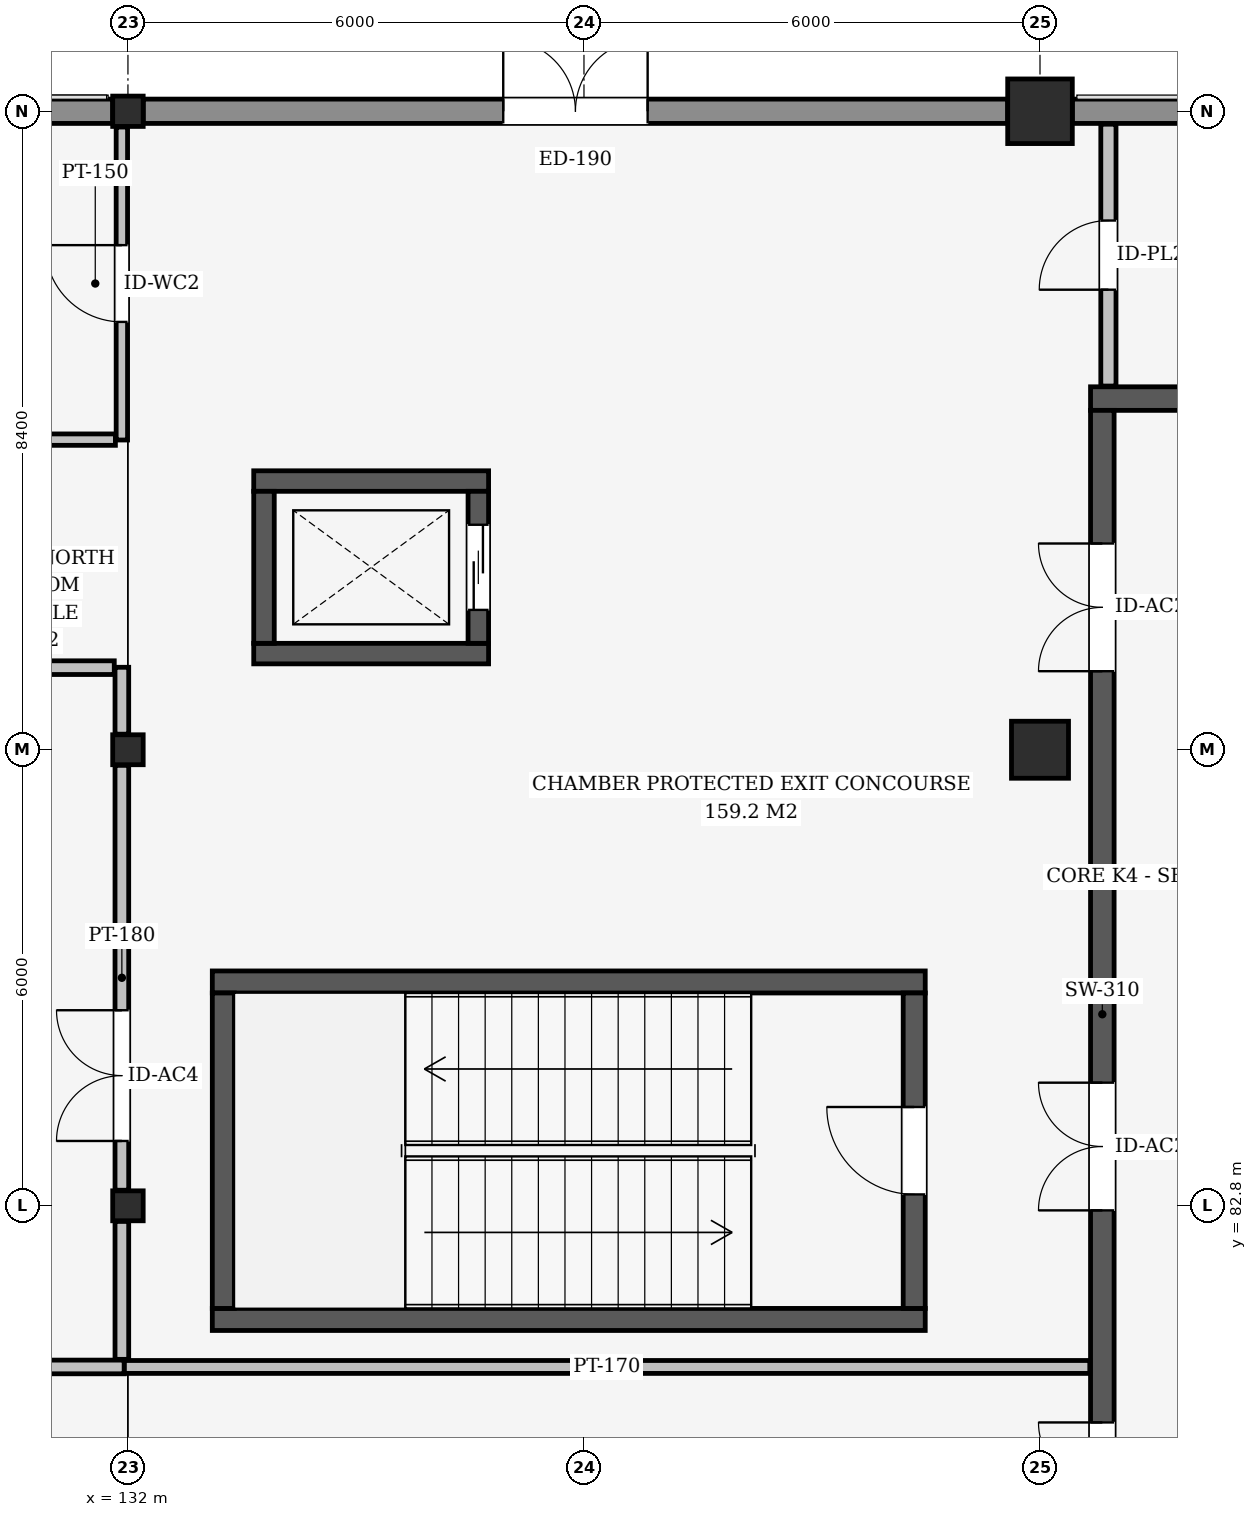
"""IFC4 building model, lengths in metres.
Left out: names, types, materials, properties, quantities, classifications, styles, units other than length and angle.
Written with IfcOpenShell. Run it as: python <this file> out.ifc"""

import sys

from ifc_helpers import new_model, si_unit, direction, frame, frame_2d, origin, origin_2d, place, context, subcontext, project, spatial, rectangle, i_section, extrude, element, fill, save


model = new_model("IFC4")
c1 = context("Model", 3, precision=1e-05, world=origin(), true_north=direction((0.0, 1.0)))
c2 = subcontext(c1, "Body", "Model", "MODEL_VIEW")
j1 = project(units=[si_unit("LENGTHUNIT", "METRE"), si_unit("PLANEANGLEUNIT", "RADIAN")], contexts=[c1])
p1 = place(None, origin())
s1 = spatial("IfcSite", under=j1, at=p1, CompositionType="ELEMENT")
p2 = place(p1, origin())
s2 = spatial("IfcBuilding", under=s1, at=p2, CompositionType="ELEMENT")
p3 = place(p2, origin())
s3 = spatial("IfcBuildingStorey", under=s2, at=p3, CompositionType="ELEMENT", Elevation=0.0)
for number, where, z_axis, x_axis in (
    (1, (132.0, 82.8, 0.0), (0.0, 0.0, 1.0), (1.0, 0.0, 0.0)),
    (2, (132.0, 88.8, 0.0), (0.0, 0.0, 1.0), (1.0, 0.0, 0.0)),
):
    element("IfcColumn", number, at=place(p3, frame(where, z_axis=z_axis, x_axis=x_axis)), inside=s3, PredefinedType="COLUMN", context=c2, shape_type="SweptSolid", body=[
        extrude(i_section(OverallWidth=0.401, OverallDepth=0.394, WebThickness=0.023, FlangeThickness=0.037, at=origin_2d()), origin(), (0.0, 0.0, 1.0), 4.8),
    ])
p4 = place(p3, frame((132.0, 97.2, 0.0), z_axis=(0.0, 0.0, 1.0), x_axis=(1.0, 0.0, 0.0)))
e3 = element("IfcColumn", 3, at=p4, inside=s3, PredefinedType="COLUMN", context=c2, shape_type="SweptSolid", body=[
    extrude(i_section(OverallWidth=0.401, OverallDepth=0.399, WebThickness=0.025, FlangeThickness=0.04, at=origin_2d()), origin(), (0.0, 0.0, 1.0), 4.8),
])
p5 = place(p3, frame((144.0, 88.8, 0.0), z_axis=(0.0, 0.0, 1.0), x_axis=(1.0, 0.0, 0.0)))
e4 = element("IfcColumn", 4, at=p5, inside=s3, PredefinedType="COLUMN", context=c2, shape_type="SweptSolid", body=[
    extrude(rectangle(XDim=0.75, YDim=0.75, at=origin_2d()), origin(), (0.0, 0.0, 1.0), 4.8),
])
p6 = place(p3, frame((144.0, 97.2, 0.0), z_axis=(0.0, 0.0, 1.0), x_axis=(1.0, 0.0, 0.0)))
e5 = element("IfcColumn", 5, at=p6, inside=s3, PredefinedType="COLUMN", context=c2, shape_type="SweptSolid", body=[
    extrude(rectangle(XDim=0.85, YDim=0.85, at=origin_2d()), origin(), (0.0, 0.0, 1.0), 4.8),
])
p7 = place(p3, frame((144.665, 93.42, 0.0), z_axis=(0.0, 0.0, 1.0), x_axis=(1.0, 0.0, 0.0)))
e6 = element("IfcWall", 6, at=p7, inside=s3, PredefinedType="SHEAR", context=c2, shape_type="SweptSolid", body=[
    extrude(rectangle(XDim=12.67, YDim=0.31, at=frame_2d((6.335, 0.0))), origin(), (0.0, 0.0, 1.0), 4.5),
])
p8 = place(p7, frame((5.88, 0.0, 0.0)))
e7 = element("IfcOpeningElement", 7, at=p8, cuts=e6, PredefinedType="OPENING", context=c2, shape_type="SweptSolid", body=[
    extrude(rectangle(XDim=0.91, YDim=2.1, at=frame_2d((0.455, 1.05))), frame((0.0, 0.165, 0.0), z_axis=(0.0, -1.0, 0.0), x_axis=(1.0, 0.0, 0.0)), (0.0, 0.0, 1.0), 0.33),
])
p9 = place(p3, frame((144.82, 77.375, 0.0), z_axis=(0.0, 0.0, 1.0), x_axis=(0.0, 1.0, 0.0)))
e8 = element("IfcWall", 8, at=p9, inside=s3, PredefinedType="SHEAR", context=c2, shape_type="SweptSolid", body=[
    extrude(rectangle(XDim=15.89, YDim=0.31, at=frame_2d((7.945, 0.0))), origin(), (0.0, 0.0, 1.0), 4.5),
])
p10 = place(p9, frame((0.895, 0.0, 0.0)))
e9 = element("IfcOpeningElement", 9, at=p10, cuts=e8, PredefinedType="OPENING", context=c2, shape_type="SweptSolid", body=[
    extrude(rectangle(XDim=1.68, YDim=2.32, at=frame_2d((0.84, 1.16))), frame((0.0, 0.165, 0.0), z_axis=(0.0, -1.0, 0.0), x_axis=(1.0, 0.0, 0.0)), (0.0, 0.0, 1.0), 0.33),
])
p11 = place(p9, frame((5.365, 0.0, 0.0)))
e10 = element("IfcOpeningElement", 10, at=p11, cuts=e8, PredefinedType="OPENING", context=c2, shape_type="SweptSolid", body=[
    extrude(rectangle(XDim=1.68, YDim=2.32, at=frame_2d((0.84, 1.16))), frame((0.0, 0.165, 0.0), z_axis=(0.0, -1.0, 0.0), x_axis=(1.0, 0.0, 0.0)), (0.0, 0.0, 1.0), 0.33),
])
p12 = place(p9, frame((12.458, 0.0, 0.0)))
e11 = element("IfcOpeningElement", 11, at=p12, cuts=e8, PredefinedType="OPENING", context=c2, shape_type="SweptSolid", body=[
    extrude(rectangle(XDim=1.68, YDim=2.32, at=frame_2d((0.84, 1.16))), frame((0.0, 0.165, 0.0), z_axis=(0.0, -1.0, 0.0), x_axis=(1.0, 0.0, 0.0)), (0.0, 0.0, 1.0), 0.33),
])
p13 = place(p3, frame((120.2, 97.2, 0.0), z_axis=(0.0, 0.0, 1.0), x_axis=(1.0, 0.0, 0.0)))
e12 = element("IfcWall", 12, at=p13, inside=s3, PredefinedType="SOLIDWALL", context=c2, shape_type="SweptSolid", body=[
    extrude(rectangle(XDim=11.599, YDim=0.32, at=frame_2d((5.8, 0.0))), origin(), (0.0, 0.0, 1.0), 3.67),
])
p14 = place(p13, frame((2.423, 0.0, 0.85)))
e13 = element("IfcOpeningElement", 13, at=p14, cuts=e12, PredefinedType="OPENING", context=c2, shape_type="SweptSolid", body=[
    extrude(rectangle(XDim=1.65, YDim=1.75, at=frame_2d((0.825, 0.875))), frame((0.0, 0.17, 0.0), z_axis=(0.0, -1.0, 0.0), x_axis=(1.0, 0.0, 0.0)), (0.0, 0.0, 1.0), 0.34),
])
p15 = place(p3, frame((132.2, 97.2, 0.0), z_axis=(0.0, 0.0, 1.0), x_axis=(1.0, 0.0, 0.0)))
e14 = element("IfcWall", 14, at=p15, inside=s3, PredefinedType="SOLIDWALL", context=c2, shape_type="SweptSolid", body=[
    extrude(rectangle(XDim=11.375, YDim=0.32, at=frame_2d((5.687, 0.0))), origin(), (0.0, 0.0, 1.0), 3.67),
])
p16 = place(p15, frame((4.737, 0.0, 0.0)))
e15 = element("IfcOpeningElement", 15, at=p16, cuts=e14, PredefinedType="OPENING", context=c2, shape_type="SweptSolid", body=[
    extrude(rectangle(XDim=1.9, YDim=2.35, at=frame_2d((0.95, 1.175))), frame((0.0, 0.17, 0.0), z_axis=(0.0, -1.0, 0.0), x_axis=(1.0, 0.0, 0.0)), (0.0, 0.0, 1.0), 0.34),
])
p17 = place(p3, frame((144.425, 97.2, 0.0), z_axis=(0.0, 0.0, 1.0), x_axis=(1.0, 0.0, 0.0)))
e16 = element("IfcWall", 16, at=p17, inside=s3, PredefinedType="SOLIDWALL", context=c2, shape_type="SweptSolid", body=[
    extrude(rectangle(XDim=11.15, YDim=0.32, at=frame_2d((5.575, 0.0))), origin(), (0.0, 0.0, 1.0), 3.63),
])
for number, where, z_axis, x_axis in (
    (17, (133.11, 81.305, 0.0), (0.0, 0.0, 1.0), (1.0, 0.0, 0.0)),
    (18, (133.11, 85.745, 0.0), (0.0, 0.0, 1.0), (1.0, 0.0, 0.0)),
):
    element("IfcWall", number, at=place(p3, frame(where, z_axis=z_axis, x_axis=x_axis)), inside=s3, PredefinedType="SHEAR", context=c2, shape_type="SweptSolid", body=[
        extrude(rectangle(XDim=9.38, YDim=0.29, at=frame_2d((4.69, 0.0))), origin(), (0.0, 0.0, 1.0), 4.54),
    ])
p18 = place(p3, frame((133.255, 81.45, 0.0), z_axis=(0.0, 0.0, 1.0), x_axis=(0.0, 1.0, 0.0)))
e19 = element("IfcWall", 19, at=p18, inside=s3, PredefinedType="SHEAR", context=c2, shape_type="SweptSolid", body=[
    extrude(rectangle(XDim=4.15, YDim=0.29, at=frame_2d((2.075, 0.0))), origin(), (0.0, 0.0, 1.0), 4.54),
])
p19 = place(p3, frame((142.345, 81.45, 0.0), z_axis=(0.0, 0.0, 1.0), x_axis=(0.0, 1.0, 0.0)))
e20 = element("IfcWall", 20, at=p19, inside=s3, PredefinedType="SHEAR", context=c2, shape_type="SweptSolid", body=[
    extrude(rectangle(XDim=4.15, YDim=0.29, at=frame_2d((2.075, 0.0))), origin(), (0.0, 0.0, 1.0), 4.54),
])
p20 = place(p19, frame((1.5, 0.0, 0.0)))
e21 = element("IfcOpeningElement", 21, at=p20, cuts=e20, PredefinedType="OPENING", context=c2, shape_type="SweptSolid", body=[
    extrude(rectangle(XDim=1.15, YDim=2.15, at=frame_2d((0.575, 1.075))), frame((0.0, 0.155, 0.0), z_axis=(0.0, -1.0, 0.0), x_axis=(1.0, 0.0, 0.0)), (0.0, 0.0, 1.0), 0.31),
])
for number, where, z_axis, x_axis in (
    (22, (133.655, 90.065, 0.0), (0.0, 0.0, 1.0), (1.0, 0.0, 0.0)),
    (23, (133.655, 92.335, 0.0), (0.0, 0.0, 1.0), (1.0, 0.0, 0.0)),
):
    element("IfcWall", number, at=place(p3, frame(where, z_axis=z_axis, x_axis=x_axis)), inside=s3, PredefinedType="SHEAR", context=c2, shape_type="SweptSolid", body=[
        extrude(rectangle(XDim=3.09, YDim=0.27, at=frame_2d((1.545, 0.0))), origin(), (0.0, 0.0, 1.0), 4.54),
    ])
p21 = place(p3, frame((133.79, 90.2, 0.0), z_axis=(0.0, 0.0, 1.0), x_axis=(0.0, 1.0, 0.0)))
e24 = element("IfcWall", 24, at=p21, inside=s3, PredefinedType="SHEAR", context=c2, shape_type="SweptSolid", body=[
    extrude(rectangle(XDim=2.0, YDim=0.27, at=frame_2d((1.0, 0.0))), origin(), (0.0, 0.0, 1.0), 4.54),
])
p22 = place(p3, frame((136.61, 90.2, 0.0), z_axis=(0.0, 0.0, 1.0), x_axis=(0.0, 1.0, 0.0)))
e25 = element("IfcWall", 25, at=p22, inside=s3, PredefinedType="SHEAR", context=c2, shape_type="SweptSolid", body=[
    extrude(rectangle(XDim=2.0, YDim=0.27, at=frame_2d((1.0, 0.0))), origin(), (0.0, 0.0, 1.0), 4.54),
])
p23 = place(p22, frame((0.44, 0.0, 0.0)))
e26 = element("IfcOpeningElement", 26, at=p23, cuts=e25, PredefinedType="OPENING", context=c2, shape_type="SweptSolid", body=[
    extrude(rectangle(XDim=1.12, YDim=2.15, at=frame_2d((0.56, 1.075))), frame((0.0, 0.145, 0.0), z_axis=(0.0, -1.0, 0.0), x_axis=(1.0, 0.0, 0.0)), (0.0, 0.0, 1.0), 0.29),
])
p24 = place(p3, frame((131.95, 80.68, 0.0), z_axis=(0.0, 0.0, 1.0), x_axis=(1.0, 0.0, 0.0)))
e27 = element("IfcWall", 27, at=p24, inside=s3, PredefinedType="PARTITIONING", context=c2, shape_type="SweptSolid", body=[
    extrude(rectangle(XDim=12.705, YDim=0.17, at=frame_2d((6.353, 0.0))), origin(), (0.0, 0.0, 1.0), 4.52),
])
p25 = place(p3, frame((120.05, 80.68, 0.0), z_axis=(0.0, 0.0, 1.0), x_axis=(1.0, 0.0, 0.0)))
e28 = element("IfcWall", 28, at=p25, inside=s3, PredefinedType="PARTITIONING", context=c2, shape_type="SweptSolid", body=[
    extrude(rectangle(XDim=11.9, YDim=0.18, at=frame_2d((5.95, 0.0))), origin(), (0.0, 0.0, 1.0), 4.52),
])
p26 = place(p25, frame((5.09, 0.0, 0.0)))
e29 = element("IfcOpeningElement", 29, at=p26, cuts=e28, PredefinedType="OPENING", context=c2, shape_type="SweptSolid", body=[
    extrude(rectangle(XDim=1.72, YDim=2.34, at=frame_2d((0.86, 1.17))), frame((0.0, 0.1, 0.0), z_axis=(0.0, -1.0, 0.0), x_axis=(1.0, 0.0, 0.0)), (0.0, 0.0, 1.0), 0.2),
])
p27 = place(p3, frame((131.92, 80.78, 0.0), z_axis=(0.0, 0.0, 1.0), x_axis=(0.0, 1.0, 0.0)))
e30 = element("IfcWall", 30, at=p27, inside=s3, PredefinedType="PARTITIONING", context=c2, shape_type="SweptSolid", body=[
    extrude(rectangle(XDim=1.815, YDim=0.18, at=frame_2d((0.907, 0.0))), origin(), (0.0, 0.0, 1.0), 3.909),
])
p28 = place(p3, frame((131.92, 83.005, 0.0), z_axis=(0.0, 0.0, 1.0), x_axis=(0.0, 1.0, 0.0)))
e31 = element("IfcWall", 31, at=p28, inside=s3, PredefinedType="PARTITIONING", context=c2, shape_type="SweptSolid", body=[
    extrude(rectangle(XDim=5.59, YDim=0.18, at=frame_2d((2.795, 0.0))), origin(), (0.0, 0.0, 1.0), 3.908),
])
p29 = place(p28, frame((0.648, 0.0, 0.0)))
e32 = element("IfcOpeningElement", 32, at=p29, cuts=e31, PredefinedType="OPENING", context=c2, shape_type="SweptSolid", body=[
    extrude(rectangle(XDim=1.72, YDim=2.34, at=frame_2d((0.86, 1.17))), frame((0.0, 0.1, 0.0), z_axis=(0.0, -1.0, 0.0), x_axis=(1.0, 0.0, 0.0)), (0.0, 0.0, 1.0), 0.2),
])
p30 = place(p3, frame((131.92, 89.005, 0.0), z_axis=(0.0, 0.0, 1.0), x_axis=(0.0, 1.0, 0.0)))
e33 = element("IfcWall", 33, at=p30, inside=s3, PredefinedType="PARTITIONING", context=c2, shape_type="SweptSolid", body=[
    extrude(rectangle(XDim=0.88, YDim=0.18, at=frame_2d((0.44, 0.0))), origin(), (0.0, 0.0, 1.0), 3.908),
])
p31 = place(p3, frame((131.92, 92.875, 0.0), z_axis=(0.0, 0.0, 1.0), x_axis=(0.0, 1.0, 0.0)))
e34 = element("IfcWall", 34, at=p31, inside=s3, PredefinedType="PARTITIONING", context=c2, shape_type="SweptSolid", body=[
    extrude(rectangle(XDim=4.117, YDim=0.15, at=frame_2d((2.059, 0.0))), origin(), (0.0, 0.0, 1.0), 3.908),
])
p32 = place(p31, frame((1.554, 0.0, 0.0)))
e35 = element("IfcOpeningElement", 35, at=p32, cuts=e34, PredefinedType="OPENING", context=c2, shape_type="SweptSolid", body=[
    extrude(rectangle(XDim=1.01, YDim=2.1, at=frame_2d((0.505, 1.05))), frame((0.0, 0.085, 0.0), z_axis=(0.0, -1.0, 0.0), x_axis=(1.0, 0.0, 0.0)), (0.0, 0.0, 1.0), 0.17),
])
p33 = place(p3, frame((144.9, 93.585, 0.0), z_axis=(0.0, 0.0, 1.0), x_axis=(0.0, 1.0, 0.0)))
e36 = element("IfcWall", 36, at=p33, inside=s3, PredefinedType="PARTITIONING", context=c2, shape_type="SweptSolid", body=[
    extrude(rectangle(XDim=3.445, YDim=0.2, at=frame_2d((1.723, 0.0))), origin(), (0.0, 0.0, 1.0), 4.8),
])
p34 = place(p33, frame((1.268, 0.0, 0.0)))
e37 = element("IfcOpeningElement", 37, at=p34, cuts=e36, PredefinedType="OPENING", context=c2, shape_type="SweptSolid", body=[
    extrude(rectangle(XDim=0.91, YDim=2.1, at=frame_2d((0.455, 1.05))), frame((0.0, 0.11, 0.0), z_axis=(0.0, -1.0, 0.0), x_axis=(1.0, 0.0, 0.0)), (0.0, 0.0, 1.0), 0.22),
])
p35 = place(p3, frame((120.05, 89.88, 0.0), z_axis=(0.0, 0.0, 1.0), x_axis=(1.0, 0.0, 0.0)))
e38 = element("IfcWall", 38, at=p35, inside=s3, PredefinedType="PARTITIONING", context=c2, shape_type="SweptSolid", body=[
    extrude(rectangle(XDim=11.77, YDim=0.18, at=frame_2d((5.885, 0.0))), origin(), (0.0, 0.0, 1.0), 4.52),
])
p36 = place(p35, frame((5.025, 0.0, 0.0)))
e39 = element("IfcOpeningElement", 39, at=p36, cuts=e38, PredefinedType="OPENING", context=c2, shape_type="SweptSolid", body=[
    extrude(rectangle(XDim=1.72, YDim=2.34, at=frame_2d((0.86, 1.17))), frame((0.0, 0.1, 0.0), z_axis=(0.0, -1.0, 0.0), x_axis=(1.0, 0.0, 0.0)), (0.0, 0.0, 1.0), 0.2),
])
p37 = place(p3, frame((125.875, 92.88, 0.0), z_axis=(0.0, 0.0, 1.0), x_axis=(1.0, 0.0, 0.0)))
e40 = element("IfcWall", 40, at=p37, inside=s3, PredefinedType="PARTITIONING", context=c2, shape_type="SweptSolid", body=[
    extrude(rectangle(XDim=5.96, YDim=0.15, at=frame_2d((2.98, 0.0))), origin(), (0.0, 0.0, 1.0), 4.52),
])
p38 = place(p37, frame((2.475, 0.0, 0.0)))
e41 = element("IfcOpeningElement", 41, at=p38, cuts=e40, PredefinedType="OPENING", context=c2, shape_type="SweptSolid", body=[
    extrude(rectangle(XDim=1.01, YDim=2.1, at=frame_2d((0.505, 1.05))), frame((0.0, 0.085, 0.0), z_axis=(0.0, -1.0, 0.0), x_axis=(1.0, 0.0, 0.0)), (0.0, 0.0, 1.0), 0.17),
])
p39 = place(p16, origin())
e42 = element("IfcDoor", 42, at=p39, inside=s3, OperationType="DOUBLE_DOOR_SINGLE_SWING", PredefinedType="DOOR", context=c2, shape_type="SweptSolid", body=[
    extrude(rectangle(XDim=1.9, YDim=2.35, at=frame_2d((0.95, 1.175))), frame((0.0, 0.025, 0.0), z_axis=(0.0, -1.0, 0.0), x_axis=(1.0, 0.0, 0.0)), (0.0, 0.0, 1.0), 0.05),
])
fill(e15, e42)
p40 = place(p20, origin())
e43 = element("IfcDoor", 43, at=p40, inside=s3, OperationType="SINGLE_SWING_RIGHT", PredefinedType="DOOR", context=c2, shape_type="SweptSolid", body=[
    extrude(rectangle(XDim=1.15, YDim=2.15, at=frame_2d((0.575, 1.075))), frame((0.0, 0.025, 0.0), z_axis=(0.0, -1.0, 0.0), x_axis=(1.0, 0.0, 0.0)), (0.0, 0.0, 1.0), 0.05),
])
fill(e21, e43)
p41 = place(p23, origin())
e44 = element("IfcDoor", 44, at=p41, inside=s3, OperationType="SLIDING_TO_LEFT", PredefinedType="DOOR", context=c2, shape_type="SweptSolid", body=[
    extrude(rectangle(XDim=1.12, YDim=2.15, at=frame_2d((0.56, 1.075))), frame((0.0, 0.025, 0.0), z_axis=(0.0, -1.0, 0.0), x_axis=(1.0, 0.0, 0.0)), (0.0, 0.0, 1.0), 0.05),
])
fill(e26, e44)
p42 = place(p10, origin())
e45 = element("IfcDoor", 45, at=p42, inside=s3, OperationType="DOUBLE_DOOR_SINGLE_SWING", PredefinedType="DOOR", context=c2, shape_type="SweptSolid", body=[
    extrude(rectangle(XDim=1.68, YDim=2.32, at=frame_2d((0.84, 1.16))), frame((0.0, 0.025, 0.0), z_axis=(0.0, -1.0, 0.0), x_axis=(1.0, 0.0, 0.0)), (0.0, 0.0, 1.0), 0.05),
])
fill(e9, e45)
p43 = place(p11, origin())
e46 = element("IfcDoor", 46, at=p43, inside=s3, OperationType="DOUBLE_DOOR_SINGLE_SWING", PredefinedType="DOOR", context=c2, shape_type="SweptSolid", body=[
    extrude(rectangle(XDim=1.68, YDim=2.32, at=frame_2d((0.84, 1.16))), frame((0.0, 0.025, 0.0), z_axis=(0.0, -1.0, 0.0), x_axis=(1.0, 0.0, 0.0)), (0.0, 0.0, 1.0), 0.05),
])
fill(e10, e46)
p44 = place(p12, origin())
e47 = element("IfcDoor", 47, at=p44, inside=s3, OperationType="DOUBLE_DOOR_SINGLE_SWING", PredefinedType="DOOR", context=c2, shape_type="SweptSolid", body=[
    extrude(rectangle(XDim=1.68, YDim=2.32, at=frame_2d((0.84, 1.16))), frame((0.0, 0.025, 0.0), z_axis=(0.0, -1.0, 0.0), x_axis=(1.0, 0.0, 0.0)), (0.0, 0.0, 1.0), 0.05),
])
fill(e11, e47)
p45 = place(p29, origin())
e48 = element("IfcDoor", 48, at=p45, inside=s3, OperationType="DOUBLE_DOOR_SINGLE_SWING", PredefinedType="DOOR", context=c2, shape_type="SweptSolid", body=[
    extrude(rectangle(XDim=1.72, YDim=2.34, at=frame_2d((0.86, 1.17))), frame((0.0, 0.025, 0.0), z_axis=(0.0, -1.0, 0.0), x_axis=(1.0, 0.0, 0.0)), (0.0, 0.0, 1.0), 0.05),
])
fill(e32, e48)
p46 = place(p32, origin())
e49 = element("IfcDoor", 49, at=p46, inside=s3, OperationType="SINGLE_SWING_RIGHT", PredefinedType="DOOR", context=c2, shape_type="SweptSolid", body=[
    extrude(rectangle(XDim=1.01, YDim=2.1, at=frame_2d((0.505, 1.05))), frame((0.0, 0.025, 0.0), z_axis=(0.0, -1.0, 0.0), x_axis=(1.0, 0.0, 0.0)), (0.0, 0.0, 1.0), 0.05),
])
fill(e35, e49)
p47 = place(p34, origin())
e50 = element("IfcDoor", 50, at=p47, inside=s3, OperationType="SINGLE_SWING_LEFT", PredefinedType="DOOR", context=c2, shape_type="SweptSolid", body=[
    extrude(rectangle(XDim=0.91, YDim=2.1, at=frame_2d((0.455, 1.05))), frame((0.0, 0.025, 0.0), z_axis=(0.0, -1.0, 0.0), x_axis=(1.0, 0.0, 0.0)), (0.0, 0.0, 1.0), 0.05),
])
fill(e37, e50)
save(model, sys.argv[1])
